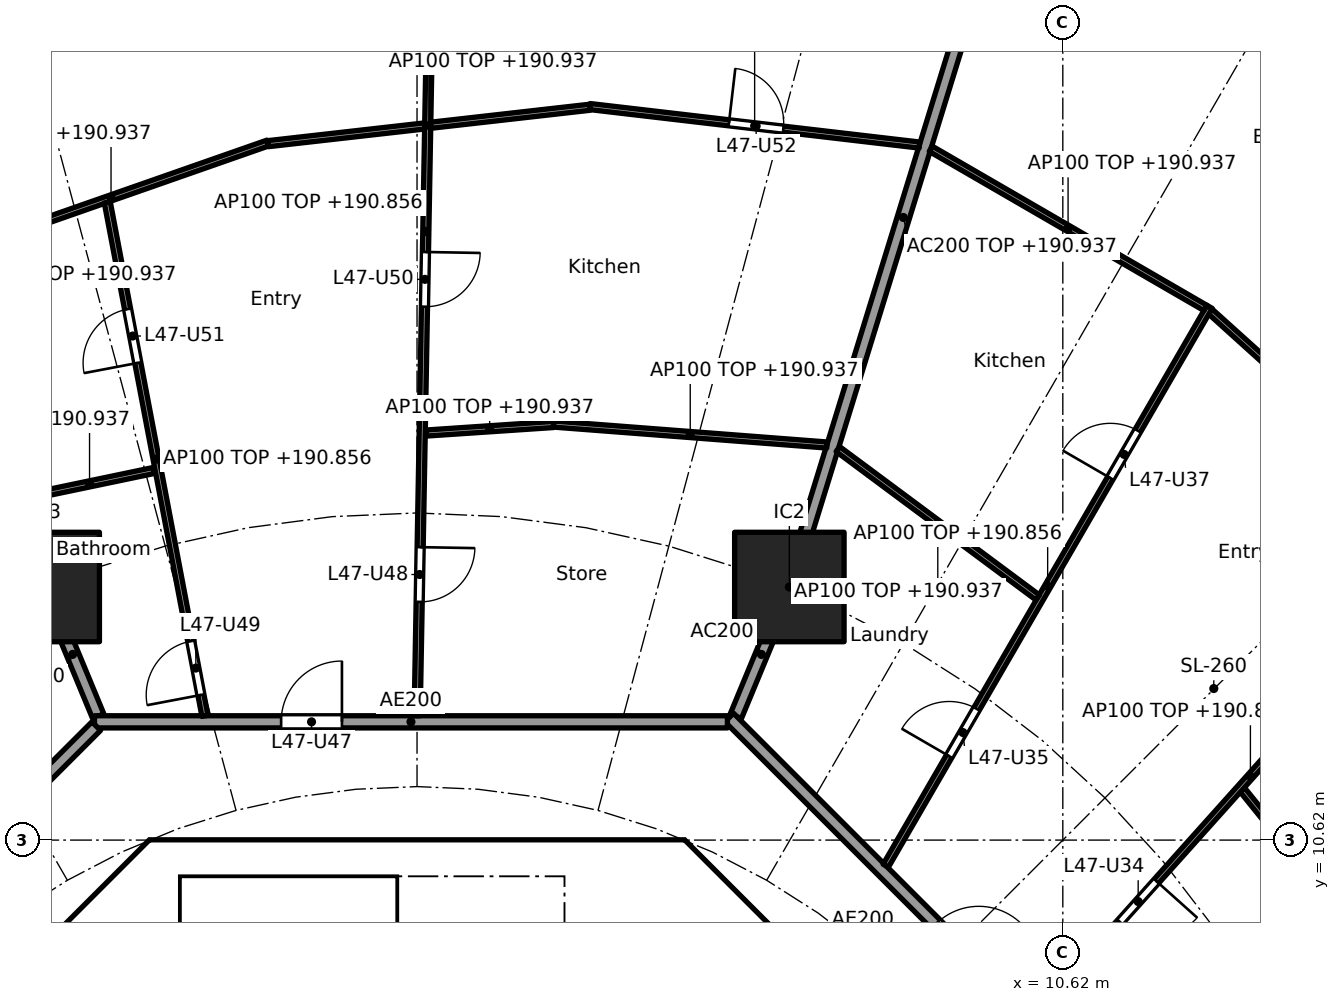
"""IFC4 building model, lengths in metres.
Left out: names, types, materials, properties, quantities, classifications, styles, units other than length and angle.
Written with IfcOpenShell. Run it as: python <this file> out.ifc"""

import sys

from ifc_helpers import new_model, si_unit, direction, frame, frame_2d, origin, origin_2d, place, context, subcontext, project, spatial, polyline, rectangle, outline, extrude, element, fill, save


model = new_model("IFC4")
c1 = context("Model", 3, precision=1e-05, world=origin(), true_north=direction((0.0, 1.0)))
c2 = subcontext(c1, "Body", "Model", "MODEL_VIEW")
j1 = project(units=[si_unit("LENGTHUNIT", "METRE"), si_unit("PLANEANGLEUNIT", "RADIAN")], contexts=[c1])
p1 = place(None, origin())
s1 = spatial("IfcSite", under=j1, at=p1, CompositionType="ELEMENT")
p2 = place(p1, origin())
s2 = spatial("IfcBuilding", under=s1, at=p2, CompositionType="ELEMENT")
p3 = place(p2, frame((0.0, 0.0, 188.1)))
s3 = spatial("IfcBuildingStorey", under=s2, at=p3, CompositionType="ELEMENT", Elevation=188.1)
for number, where, z_axis, x_axis in (
    (1, (6.123, 14.782, 0.0), (0.0, 0.0, 1.0), (1.0, 0.0, 0.0)),
    (2, (-6.123, 14.782, 0.0), (0.0, 0.0, 1.0), (1.0, 0.0, 0.0)),
):
    element("IfcColumn", number, at=place(p3, frame(where, z_axis=z_axis, x_axis=x_axis)), inside=s3, PredefinedType="COLUMN", context=c2, shape_type="SweptSolid", body=[
        extrude(rectangle(XDim=1.8, YDim=1.8, at=origin_2d()), origin(), (0.0, 0.0, 1.0), 3.7),
    ])
p4 = place(p3, frame((9.988, 4.613, 0.0), z_axis=(0.0, 0.0, 1.0), x_axis=(-0.707106781187, 0.707106781187, 0.0)))
e3 = element("IfcWall", 3, at=p4, inside=s3, PredefinedType="SHEAR", context=c2, shape_type="SweptSolid", body=[
    extrude(rectangle(XDim=7.602, YDim=0.6, at=frame_2d((3.801, 0.0))), origin(), (0.0, 0.0, 1.0), 3.44),
])
p5 = place(p4, frame((3.201, 0.0, 0.0)))
e4 = element("IfcOpeningElement", 4, at=p5, cuts=e3, PredefinedType="OPENING", context=c2, shape_type="SweptSolid", body=[
    extrude(rectangle(XDim=1.2, YDim=2.1, at=frame_2d((0.6, 1.05))), frame((0.0, 0.31, 0.0), z_axis=(0.0, -1.0, 0.0), x_axis=(1.0, 0.0, 0.0)), (0.0, 0.0, 1.0), 0.62),
])
p6 = place(p3, frame((-4.613, 9.988, 0.0), z_axis=(0.0, 0.0, 1.0), x_axis=(-0.707106781187, -0.707106781187, 0.0)))
e5 = element("IfcWall", 5, at=p6, inside=s3, PredefinedType="SHEAR", context=c2, shape_type="SweptSolid", body=[
    extrude(rectangle(XDim=7.602, YDim=0.6, at=frame_2d((3.801, 0.0))), origin(), (0.0, 0.0, 1.0), 3.44),
])
p7 = place(p6, frame((0.351, 0.0, 0.0)))
e6 = element("IfcOpeningElement", 6, at=p7, cuts=e5, PredefinedType="OPENING", context=c2, shape_type="SweptSolid", body=[
    extrude(rectangle(XDim=1.1, YDim=2.1, at=frame_2d((0.55, 1.05))), frame((0.0, 0.31, 0.0), z_axis=(0.0, -1.0, 0.0), x_axis=(1.0, 0.0, 0.0)), (0.0, 0.0, 1.0), 0.62),
])
p8 = place(p3, frame((4.0, 7.025, 0.0), z_axis=(0.0, 0.0, 1.0), x_axis=(0.0, 1.0, 0.0)))
e7 = element("IfcWall", 7, at=p8, inside=s3, PredefinedType="SOLIDWALL", context=c2, shape_type="SweptSolid", body=[
    extrude(rectangle(XDim=3.0, YDim=0.2, at=frame_2d((1.5, 0.0))), origin(), (0.0, 0.0, 1.0), 3.44),
])
p9 = place(p8, frame((0.925, 0.0, 0.0)))
e8 = element("IfcOpeningElement", 8, at=p9, cuts=e7, PredefinedType="OPENING", context=c2, shape_type="SweptSolid", body=[
    extrude(rectangle(XDim=1.1, YDim=2.1, at=frame_2d((0.55, 1.05))), frame((0.0, 0.11, 0.0), z_axis=(0.0, -1.0, 0.0), x_axis=(1.0, 0.0, 0.0)), (0.0, 0.0, 1.0), 0.22),
])
p10 = place(p3, origin())
e9 = element("IfcWall", 9, at=p10, inside=s3, PredefinedType="SHEAR", context=c2, shape_type="SweptSolid", body=[
    extrude(outline(polyline([(-4.152, 10.025), (-4.401, 9.776), (-4.825, 10.2), (-4.401, 10.625), (4.401, 10.625), (4.825, 10.2), (4.401, 9.776), (4.152, 10.025), (-4.152, 10.025)])), origin(), (0.0, 0.0, 1.0), 3.44),
])
p11 = place(p3, origin())
e10 = element("IfcWall", 10, at=p11, inside=s3, PredefinedType="SOLIDWALL", context=c2, shape_type="SweptSolid", body=[
    extrude(outline(polyline([(-3.9, 7.025), (-4.1, 7.025), (-4.1, 10.025), (-3.9, 10.025), (-3.9, 7.025)])), origin(), (0.0, 0.0, 1.0), 3.44),
])
p12 = place(p3, frame((5.243, 12.657, 0.0), z_axis=(0.0, 0.0, 1.0), x_axis=(0.382747093259, 0.923853160736, 0.0)))
e11 = element("IfcWall", 11, at=p12, inside=s3, PredefinedType="PARTITIONING", context=c2, shape_type="SweptSolid", body=[
    extrude(rectangle(XDim=2.2, YDim=0.2, at=frame_2d((1.1, 0.0))), origin(), (0.0, 0.0, 1.0), 3.44),
])
p13 = place(p3, frame((6.138, 14.83, 0.0), z_axis=(0.0, 0.0, 1.0), x_axis=(0.294818517221, 0.955553264818, 0.0)))
e12 = element("IfcWall", 12, at=p13, inside=s3, PredefinedType="PARTITIONING", context=c2, shape_type="SweptSolid", body=[
    extrude(rectangle(XDim=12.619, YDim=0.2, at=frame_2d((6.31, 0.0))), origin(), (0.0, 0.0, 1.0), 2.837),
])
p14 = place(p3, frame((-5.243, 12.657, 0.0), z_axis=(0.0, 0.0, 1.0), x_axis=(-0.382707856524, 0.923869415315, 0.0)))
e13 = element("IfcWall", 13, at=p14, inside=s3, PredefinedType="PARTITIONING", context=c2, shape_type="SweptSolid", body=[
    extrude(rectangle(XDim=2.2, YDim=0.2, at=frame_2d((1.1, 0.0))), origin(), (0.0, 0.0, 1.0), 3.44),
])
p15 = place(p3, frame((12.635, 5.134, 0.0), z_axis=(0.0, 0.0, 1.0), x_axis=(-0.707106781187, 0.707106781187, 0.0)))
e14 = element("IfcWall", 14, at=p15, inside=s3, PredefinedType="PARTITIONING", context=c2, shape_type="SweptSolid", body=[
    extrude(rectangle(XDim=10.609, YDim=0.2, at=frame_2d((5.305, 0.0))), origin(), (0.0, 0.0, 1.0), 3.44),
])
p16 = place(p15, frame((4.804, 0.0, 0.0)))
e15 = element("IfcOpeningElement", 15, at=p16, cuts=e14, PredefinedType="OPENING", context=c2, shape_type="SweptSolid", body=[
    extrude(rectangle(XDim=1.0, YDim=2.1, at=frame_2d((0.5, 1.05))), frame((0.0, 0.11, 0.0), z_axis=(0.0, -1.0, 0.0), x_axis=(1.0, 0.0, 0.0)), (0.0, 0.0, 1.0), 0.22),
])
p17 = place(p3, frame((5.104, 12.565, 0.0), z_axis=(0.0, 0.0, 1.0), x_axis=(-1.0, 0.0, 0.0)))
e16 = element("IfcWall", 16, at=p17, inside=s3, PredefinedType="PARTITIONING", context=c2, shape_type="SweptSolid", body=[
    extrude(rectangle(XDim=10.409, YDim=0.2, at=frame_2d((5.205, 0.0))), origin(), (0.0, 0.0, 1.0), 3.44),
])
p18 = place(p17, frame((6.339, 0.0, 0.0)))
e17 = element("IfcOpeningElement", 17, at=p18, cuts=e16, PredefinedType="OPENING", context=c2, shape_type="SweptSolid", body=[
    extrude(rectangle(XDim=1.0, YDim=2.1, at=frame_2d((0.5, 1.05))), frame((0.0, 0.11, 0.0), z_axis=(0.0, -1.0, 0.0), x_axis=(1.0, 0.0, 0.0)), (0.0, 0.0, 1.0), 0.22),
])
p19 = place(p3, frame((-5.275, 12.494, 0.0), z_axis=(0.0, 0.0, 1.0), x_axis=(-0.707106781187, -0.707106781187, 0.0)))
e18 = element("IfcWall", 18, at=p19, inside=s3, PredefinedType="PARTITIONING", context=c2, shape_type="SweptSolid", body=[
    extrude(rectangle(XDim=10.209, YDim=0.2, at=frame_2d((5.104, 0.0))), origin(), (0.0, 0.0, 1.0), 3.44),
])
p20 = place(p19, frame((4.604, 0.0, 0.0)))
e19 = element("IfcOpeningElement", 19, at=p20, cuts=e18, PredefinedType="OPENING", context=c2, shape_type="SweptSolid", body=[
    extrude(rectangle(XDim=1.0, YDim=2.1, at=frame_2d((0.5, 1.05))), frame((0.0, 0.11, 0.0), z_axis=(0.0, -1.0, 0.0), x_axis=(1.0, 0.0, 0.0)), (0.0, 0.0, 1.0), 0.22),
])
p21 = place(p3, frame((16.721, 7.553, 0.0), z_axis=(0.0, 0.0, 1.0), x_axis=(-0.628753513808, 0.777604667472, 0.0)))
e20 = element("IfcWall", 20, at=p21, inside=s3, PredefinedType="PARTITIONING", context=c2, shape_type="SweptSolid", body=[
    extrude(rectangle(XDim=5.007, YDim=0.1, at=frame_2d((2.504, 0.0))), origin(), (0.0, 0.0, 1.0), 2.837),
])
p22 = place(p3, frame((10.178, 7.732, 0.0), z_axis=(0.0, 0.0, 1.0), x_axis=(0.667280084362, 0.744806880348, 0.0)))
e21 = element("IfcWall", 21, at=p22, inside=s3, PredefinedType="PARTITIONING", context=c2, shape_type="SweptSolid", body=[
    extrude(rectangle(XDim=10.572, YDim=0.1, at=frame_2d((5.286, 0.0))), origin(), (0.0, 0.0, 1.0), 2.756),
])
p23 = place(p22, frame((2.07, 0.0, 0.0)))
e22 = element("IfcOpeningElement", 22, at=p23, cuts=e21, PredefinedType="OPENING", context=c2, shape_type="SweptSolid", body=[
    extrude(rectangle(XDim=0.9, YDim=2.1, at=frame_2d((0.45, 1.05))), frame((0.0, 0.06, 0.0), z_axis=(0.0, -1.0, 0.0), x_axis=(1.0, 0.0, 0.0)), (0.0, 0.0, 1.0), 0.12),
])
p24 = place(p22, frame((7.331, 0.0, 0.0)))
e23 = element("IfcOpeningElement", 23, at=p24, cuts=e21, PredefinedType="OPENING", context=c2, shape_type="SweptSolid", body=[
    extrude(rectangle(XDim=0.9, YDim=2.1, at=frame_2d((0.45, 1.05))), frame((0.0, 0.06, 0.0), z_axis=(0.0, -1.0, 0.0), x_axis=(1.0, 0.0, 0.0)), (0.0, 0.0, 1.0), 0.12),
])
p25 = place(p3, frame((17.162, 15.603, 0.0), z_axis=(0.0, 0.0, 1.0), x_axis=(-0.742790086539, 0.66952437397, 0.0)))
e24 = element("IfcWall", 24, at=p25, inside=s3, PredefinedType="PARTITIONING", context=c2, shape_type="SweptSolid", body=[
    extrude(rectangle(XDim=5.542, YDim=0.1, at=frame_2d((2.771, 0.0))), origin(), (0.0, 0.0, 1.0), 2.837),
])
p26 = place(p25, frame((0.935, 0.0, 0.0)))
e25 = element("IfcOpeningElement", 25, at=p26, cuts=e24, PredefinedType="OPENING", context=c2, shape_type="SweptSolid", body=[
    extrude(rectangle(XDim=0.9, YDim=2.1, at=frame_2d((0.45, 1.05))), frame((0.0, 0.06, 0.0), z_axis=(0.0, -1.0, 0.0), x_axis=(1.0, 0.0, 0.0)), (0.0, 0.0, 1.0), 0.12),
])
p27 = place(p3, frame((7.708, 10.198, 0.0), z_axis=(0.0, 0.0, 1.0), x_axis=(0.501288100085, 0.865280440501, 0.0)))
e26 = element("IfcWall", 26, at=p27, inside=s3, PredefinedType="PARTITIONING", context=c2, shape_type="SweptSolid", body=[
    extrude(rectangle(XDim=10.623, YDim=0.1, at=frame_2d((5.312, 0.0))), origin(), (0.0, 0.0, 1.0), 2.756),
])
p28 = place(p27, frame((2.082, 0.0, 0.0)))
e27 = element("IfcOpeningElement", 27, at=p28, cuts=e26, PredefinedType="OPENING", context=c2, shape_type="SweptSolid", body=[
    extrude(rectangle(XDim=0.9, YDim=2.1, at=frame_2d((0.45, 1.05))), frame((0.0, 0.06, 0.0), z_axis=(0.0, -1.0, 0.0), x_axis=(1.0, 0.0, 0.0)), (0.0, 0.0, 1.0), 0.12),
])
p29 = place(p27, frame((7.369, 0.0, 0.0)))
e28 = element("IfcOpeningElement", 28, at=p29, cuts=e26, PredefinedType="OPENING", context=c2, shape_type="SweptSolid", body=[
    extrude(rectangle(XDim=0.9, YDim=2.1, at=frame_2d((0.45, 1.05))), frame((0.0, 0.06, 0.0), z_axis=(0.0, -1.0, 0.0), x_axis=(1.0, 0.0, 0.0)), (0.0, 0.0, 1.0), 0.12),
])
p30 = place(p3, frame((10.207, 14.61, 0.0), z_axis=(0.0, 0.0, 1.0), x_axis=(-0.802769141821, 0.596289950394, 0.0)))
e29 = element("IfcWall", 29, at=p30, inside=s3, PredefinedType="PARTITIONING", context=c2, shape_type="SweptSolid", body=[
    extrude(rectangle(XDim=4.092, YDim=0.1, at=frame_2d((2.046, 0.0))), origin(), (0.0, 0.0, 1.0), 2.837),
])
p31 = place(p3, frame((12.965, 19.371, 0.0), z_axis=(0.0, 0.0, 1.0), x_axis=(-0.865286427811, 0.501277765163, 0.0)))
e30 = element("IfcWall", 30, at=p31, inside=s3, PredefinedType="PARTITIONING", context=c2, shape_type="SweptSolid", body=[
    extrude(rectangle(XDim=5.22, YDim=0.1, at=frame_2d((2.61, 0.0))), origin(), (0.0, 0.0, 1.0), 2.837),
])
p32 = place(p3, frame((6.741, 17.117, 0.0), z_axis=(0.0, 0.0, 1.0), x_axis=(-0.997078320723, 0.076386008825, 0.0)))
e31 = element("IfcWall", 31, at=p32, inside=s3, PredefinedType="PARTITIONING", context=c2, shape_type="SweptSolid", body=[
    extrude(rectangle(XDim=4.51, YDim=0.1, at=frame_2d((2.255, 0.0))), origin(), (0.0, 0.0, 1.0), 2.837),
])
p33 = place(p3, frame((8.262, 22.05, 0.0), z_axis=(0.0, 0.0, 1.0), x_axis=(-0.993250089265, 0.115992500516, 0.0)))
e32 = element("IfcWall", 32, at=p33, inside=s3, PredefinedType="PARTITIONING", context=c2, shape_type="SweptSolid", body=[
    extrude(rectangle(XDim=5.458, YDim=0.1, at=frame_2d((2.729, 0.0))), origin(), (0.0, 0.0, 1.0), 2.837),
])
p34 = place(p33, frame((2.254, 0.0, 0.0)))
e33 = element("IfcOpeningElement", 33, at=p34, cuts=e32, PredefinedType="OPENING", context=c2, shape_type="SweptSolid", body=[
    extrude(rectangle(XDim=0.9, YDim=2.1, at=frame_2d((0.45, 1.05))), frame((0.0, 0.06, 0.0), z_axis=(0.0, -1.0, 0.0), x_axis=(1.0, 0.0, 0.0)), (0.0, 0.0, 1.0), 0.12),
])
p35 = place(p3, frame((2.244, 17.455, 0.0), z_axis=(0.0, 0.0, 1.0), x_axis=(-0.997756833447, -0.06694252243, 0.0)))
e34 = element("IfcWall", 34, at=p35, inside=s3, PredefinedType="PARTITIONING", context=c2, shape_type="SweptSolid", body=[
    extrude(rectangle(XDim=2.104, YDim=0.1, at=frame_2d((1.052, 0.0))), origin(), (0.0, 0.0, 1.0), 2.837),
])
p36 = place(p3, frame((2.842, 22.671, 0.0), z_axis=(0.0, 0.0, 1.0), x_axis=(-0.993660315081, -0.112424099879, 0.0)))
e35 = element("IfcWall", 35, at=p36, inside=s3, PredefinedType="PARTITIONING", context=c2, shape_type="SweptSolid", body=[
    extrude(rectangle(XDim=5.325, YDim=0.1, at=frame_2d((2.662, 0.0))), origin(), (0.0, 0.0, 1.0), 2.837),
])
p37 = place(p3, frame((0.002, 12.665, 0.0), z_axis=(0.0, 0.0, 1.0), x_axis=(0.01792079652, 0.999839409631, 0.0)))
e36 = element("IfcWall", 36, at=p37, inside=s3, PredefinedType="PARTITIONING", context=c2, shape_type="SweptSolid", body=[
    extrude(rectangle(XDim=15.926, YDim=0.1, at=frame_2d((7.963, 0.0))), origin(), (0.0, 0.0, 1.0), 2.756),
])
p38 = place(p37, frame((1.873, 0.0, 0.0)))
e37 = element("IfcOpeningElement", 37, at=p38, cuts=e36, PredefinedType="OPENING", context=c2, shape_type="SweptSolid", body=[
    extrude(rectangle(XDim=0.9, YDim=2.1, at=frame_2d((0.45, 1.05))), frame((0.0, 0.06, 0.0), z_axis=(0.0, -1.0, 0.0), x_axis=(1.0, 0.0, 0.0)), (0.0, 0.0, 1.0), 0.12),
])
p39 = place(p37, frame((6.728, 0.0, 0.0)))
e38 = element("IfcOpeningElement", 38, at=p39, cuts=e36, PredefinedType="OPENING", context=c2, shape_type="SweptSolid", body=[
    extrude(rectangle(XDim=0.9, YDim=2.1, at=frame_2d((0.45, 1.05))), frame((0.0, 0.06, 0.0), z_axis=(0.0, -1.0, 0.0), x_axis=(1.0, 0.0, 0.0)), (0.0, 0.0, 1.0), 0.12),
])
p40 = place(p37, frame((12.367, 0.0, 0.0)))
e39 = element("IfcOpeningElement", 39, at=p40, cuts=e36, PredefinedType="OPENING", context=c2, shape_type="SweptSolid", body=[
    extrude(rectangle(XDim=0.9, YDim=2.1, at=frame_2d((0.45, 1.05))), frame((0.0, 0.06, 0.0), z_axis=(0.0, -1.0, 0.0), x_axis=(1.0, 0.0, 0.0)), (0.0, 0.0, 1.0), 0.12),
])
p41 = place(p3, frame((-2.452, 22.083, 0.0), z_axis=(0.0, 0.0, 1.0), x_axis=(-0.943918212431, -0.330179357684, 0.0)))
e40 = element("IfcWall", 40, at=p41, inside=s3, PredefinedType="PARTITIONING", context=c2, shape_type="SweptSolid", body=[
    extrude(rectangle(XDim=5.467, YDim=0.1, at=frame_2d((2.734, 0.0))), origin(), (0.0, 0.0, 1.0), 2.837),
])
p42 = place(p3, frame((-3.488, 12.663, 0.0), z_axis=(0.0, 0.0, 1.0), x_axis=(-0.186783185485, 0.982401161247, 0.0)))
e41 = element("IfcWall", 41, at=p42, inside=s3, PredefinedType="PARTITIONING", context=c2, shape_type="SweptSolid", body=[
    extrude(rectangle(XDim=8.595, YDim=0.1, at=frame_2d((4.298, 0.0))), origin(), (0.0, 0.0, 1.0), 2.756),
])
p43 = place(p42, frame((0.35, 0.0, 0.0)))
e42 = element("IfcOpeningElement", 42, at=p43, cuts=e41, PredefinedType="OPENING", context=c2, shape_type="SweptSolid", body=[
    extrude(rectangle(XDim=0.9, YDim=2.1, at=frame_2d((0.45, 1.05))), frame((0.0, 0.06, 0.0), z_axis=(0.0, -1.0, 0.0), x_axis=(1.0, 0.0, 0.0)), (0.0, 0.0, 1.0), 0.12),
])
p44 = place(p42, frame((5.908, 0.0, 0.0)))
e43 = element("IfcOpeningElement", 43, at=p44, cuts=e41, PredefinedType="OPENING", context=c2, shape_type="SweptSolid", body=[
    extrude(rectangle(XDim=0.9, YDim=2.1, at=frame_2d((0.45, 1.05))), frame((0.0, 0.06, 0.0), z_axis=(0.0, -1.0, 0.0), x_axis=(1.0, 0.0, 0.0)), (0.0, 0.0, 1.0), 0.12),
])
p45 = place(p3, frame((-4.324, 16.699, 0.0), z_axis=(0.0, 0.0, 1.0), x_axis=(-0.978909151576, -0.204296042448, 0.0)))
e44 = element("IfcWall", 44, at=p45, inside=s3, PredefinedType="PARTITIONING", context=c2, shape_type="SweptSolid", body=[
    extrude(rectangle(XDim=2.168, YDim=0.1, at=frame_2d((1.084, 0.0))), origin(), (0.0, 0.0, 1.0), 2.837),
])
p46 = place(p7, origin())
e45 = element("IfcDoor", 45, at=p46, inside=s3, OperationType="SINGLE_SWING_RIGHT", PredefinedType="DOOR", context=c2, shape_type="SweptSolid", body=[
    extrude(rectangle(XDim=1.1, YDim=2.1, at=frame_2d((0.55, 1.05))), frame((0.0, 0.025, 0.0), z_axis=(0.0, -1.0, 0.0), x_axis=(1.0, 0.0, 0.0)), (0.0, 0.0, 1.0), 0.05),
])
fill(e6, e45)
p47 = place(p23, frame((0.9, 0.0, 0.0), x_axis=(-1.0, 0.0, 0.0)))
e46 = element("IfcDoor", 46, at=p47, inside=s3, OperationType="SINGLE_SWING_LEFT", PredefinedType="DOOR", context=c2, shape_type="SweptSolid", body=[
    extrude(rectangle(XDim=0.9, YDim=2.1, at=frame_2d((0.45, 1.05))), frame((0.0, 0.025, 0.0), z_axis=(0.0, -1.0, 0.0), x_axis=(1.0, 0.0, 0.0)), (0.0, 0.0, 1.0), 0.05),
])
fill(e22, e46)
p48 = place(p28, origin())
e47 = element("IfcDoor", 47, at=p48, inside=s3, OperationType="SINGLE_SWING_LEFT", PredefinedType="DOOR", context=c2, shape_type="SweptSolid", body=[
    extrude(rectangle(XDim=0.9, YDim=2.1, at=frame_2d((0.45, 1.05))), frame((0.0, 0.025, 0.0), z_axis=(0.0, -1.0, 0.0), x_axis=(1.0, 0.0, 0.0)), (0.0, 0.0, 1.0), 0.05),
])
fill(e27, e47)
p49 = place(p29, origin())
e48 = element("IfcDoor", 48, at=p49, inside=s3, OperationType="SINGLE_SWING_LEFT", PredefinedType="DOOR", context=c2, shape_type="SweptSolid", body=[
    extrude(rectangle(XDim=0.9, YDim=2.1, at=frame_2d((0.45, 1.05))), frame((0.0, 0.025, 0.0), z_axis=(0.0, -1.0, 0.0), x_axis=(1.0, 0.0, 0.0)), (0.0, 0.0, 1.0), 0.05),
])
fill(e28, e48)
p50 = place(p18, frame((1.0, 0.0, 0.0), x_axis=(-1.0, 0.0, 0.0)))
e49 = element("IfcDoor", 49, at=p50, inside=s3, OperationType="SINGLE_SWING_RIGHT", PredefinedType="DOOR", context=c2, shape_type="SweptSolid", body=[
    extrude(rectangle(XDim=1.0, YDim=2.1, at=frame_2d((0.5, 1.05))), frame((0.0, 0.025, 0.0), z_axis=(0.0, -1.0, 0.0), x_axis=(1.0, 0.0, 0.0)), (0.0, 0.0, 1.0), 0.05),
])
fill(e17, e49)
p51 = place(p38, frame((0.9, 0.0, 0.0), x_axis=(-1.0, 0.0, 0.0)))
e50 = element("IfcDoor", 50, at=p51, inside=s3, OperationType="SINGLE_SWING_LEFT", PredefinedType="DOOR", context=c2, shape_type="SweptSolid", body=[
    extrude(rectangle(XDim=0.9, YDim=2.1, at=frame_2d((0.45, 1.05))), frame((0.0, 0.025, 0.0), z_axis=(0.0, -1.0, 0.0), x_axis=(1.0, 0.0, 0.0)), (0.0, 0.0, 1.0), 0.05),
])
fill(e37, e50)
p52 = place(p43, origin())
e51 = element("IfcDoor", 51, at=p52, inside=s3, OperationType="SINGLE_SWING_LEFT", PredefinedType="DOOR", context=c2, shape_type="SweptSolid", body=[
    extrude(rectangle(XDim=0.9, YDim=2.1, at=frame_2d((0.45, 1.05))), frame((0.0, 0.025, 0.0), z_axis=(0.0, -1.0, 0.0), x_axis=(1.0, 0.0, 0.0)), (0.0, 0.0, 1.0), 0.05),
])
fill(e42, e51)
p53 = place(p39, frame((0.9, 0.0, 0.0), x_axis=(-1.0, 0.0, 0.0)))
e52 = element("IfcDoor", 52, at=p53, inside=s3, OperationType="SINGLE_SWING_LEFT", PredefinedType="DOOR", context=c2, shape_type="SweptSolid", body=[
    extrude(rectangle(XDim=0.9, YDim=2.1, at=frame_2d((0.45, 1.05))), frame((0.0, 0.025, 0.0), z_axis=(0.0, -1.0, 0.0), x_axis=(1.0, 0.0, 0.0)), (0.0, 0.0, 1.0), 0.05),
])
fill(e38, e52)
p54 = place(p44, origin())
e53 = element("IfcDoor", 53, at=p54, inside=s3, OperationType="SINGLE_SWING_LEFT", PredefinedType="DOOR", context=c2, shape_type="SweptSolid", body=[
    extrude(rectangle(XDim=0.9, YDim=2.1, at=frame_2d((0.45, 1.05))), frame((0.0, 0.025, 0.0), z_axis=(0.0, -1.0, 0.0), x_axis=(1.0, 0.0, 0.0)), (0.0, 0.0, 1.0), 0.05),
])
fill(e43, e53)
p55 = place(p34, frame((0.9, 0.0, 0.0), x_axis=(-1.0, 0.0, 0.0)))
e54 = element("IfcDoor", 54, at=p55, inside=s3, OperationType="SINGLE_SWING_LEFT", PredefinedType="DOOR", context=c2, shape_type="SweptSolid", body=[
    extrude(rectangle(XDim=0.9, YDim=2.1, at=frame_2d((0.45, 1.05))), frame((0.0, 0.025, 0.0), z_axis=(0.0, -1.0, 0.0), x_axis=(1.0, 0.0, 0.0)), (0.0, 0.0, 1.0), 0.05),
])
fill(e33, e54)
save(model, sys.argv[1])
